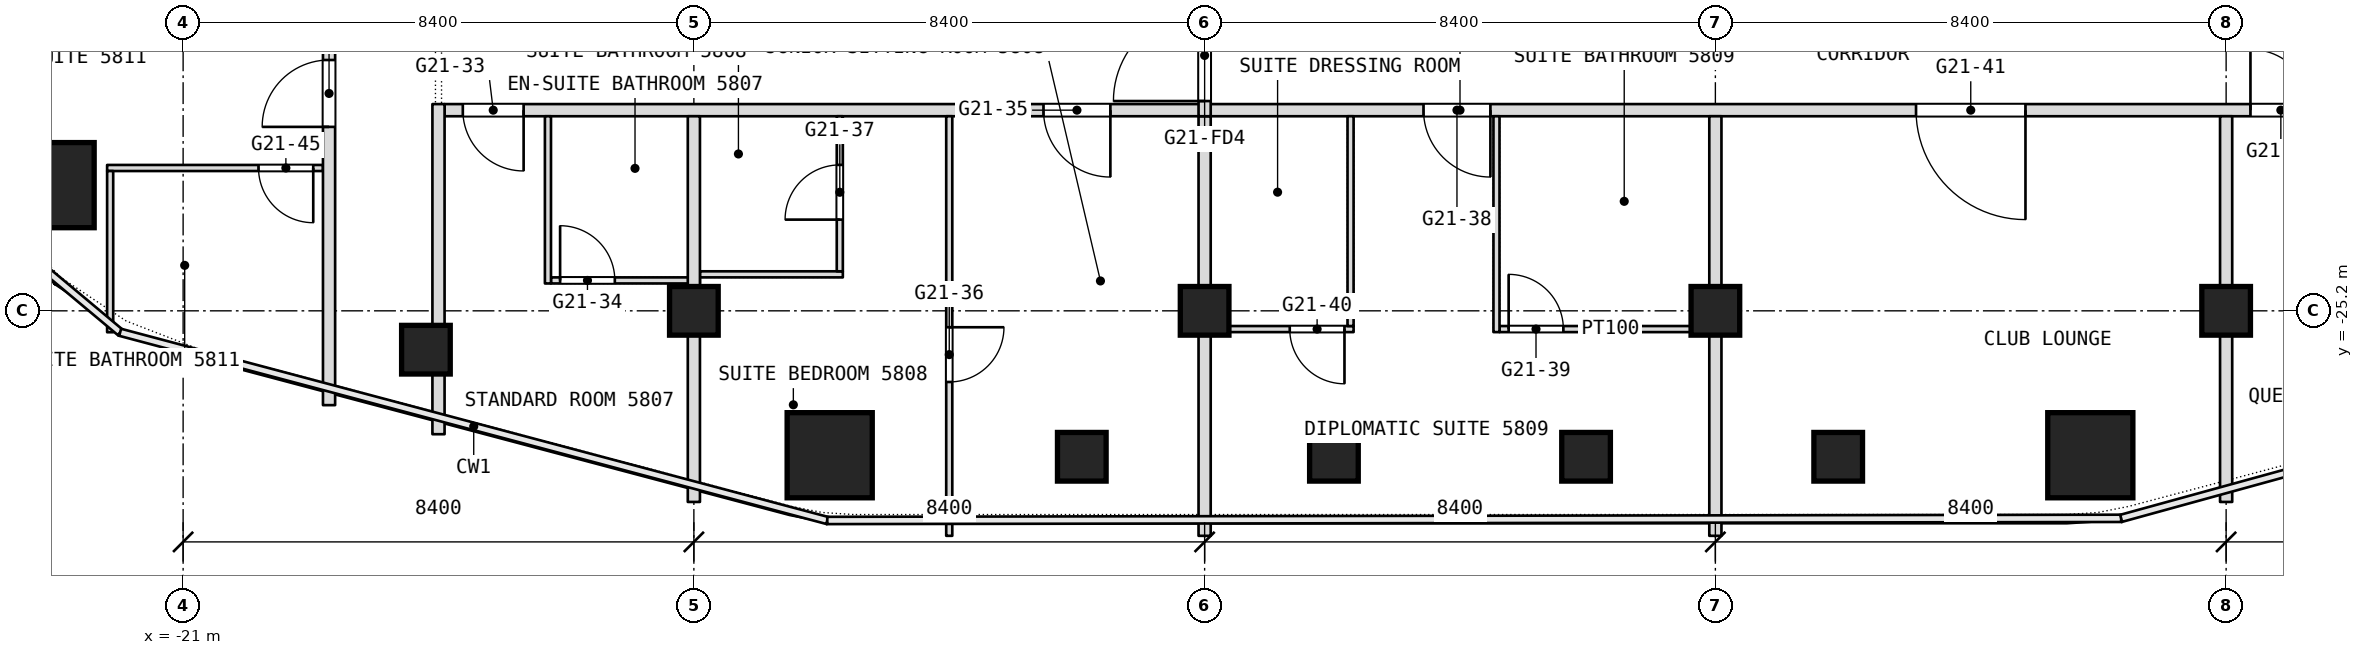
"""IFC4 building model, lengths in metres.
Left out: names, types, materials, properties, quantities, classifications, styles, units other than length and angle.
Written with IfcOpenShell. Run it as: python <this file> out.ifc"""

import sys

from ifc_helpers import new_model, si_unit, direction, frame, frame_2d, origin, origin_2d, place, context, subcontext, project, spatial, rectangle, extrude, element, fill, save


model = new_model("IFC4")
c1 = context("Model", 3, precision=1e-05, world=origin(), true_north=direction((0.0, 1.0)))
c2 = subcontext(c1, "Body", "Model", "MODEL_VIEW")
j1 = project(units=[si_unit("LENGTHUNIT", "METRE"), si_unit("PLANEANGLEUNIT", "RADIAN")], contexts=[c1])
p1 = place(None, origin())
s1 = spatial("IfcSite", under=j1, at=p1, CompositionType="ELEMENT")
p2 = place(p1, origin())
s2 = spatial("IfcBuilding", under=s1, at=p2, CompositionType="ELEMENT")
p3 = place(p2, frame((0.0, 0.0, 245.3)))
s3 = spatial("IfcBuildingStorey", under=s2, at=p3, CompositionType="ELEMENT", Elevation=245.3)
for number, where, z_axis, x_axis in (
    (1, (-23.163, -23.133, 0.0), (0.0, 0.0, 1.0), (1.0, 0.0, 0.0)),
    (2, (-10.366, -27.575, 0.0), (0.0, 0.0, 1.0), (1.0, 0.0, 0.0)),
    (3, (10.366, -27.575, 0.0), (0.0, 0.0, 1.0), (1.0, 0.0, 0.0)),
):
    element("IfcColumn", number, at=place(p3, frame(where, z_axis=z_axis, x_axis=x_axis)), inside=s3, PredefinedType="COLUMN", context=c2, shape_type="SweptSolid", body=[
        extrude(rectangle(XDim=1.4, YDim=1.4, at=origin_2d()), origin(), (0.0, 0.0, 1.0), 3.6),
    ])
for number, where, z_axis, x_axis in (
    (4, (-12.6, -25.2, 0.0), (0.0, 0.0, 1.0), (1.0, 0.0, 0.0)),
    (5, (-4.2, -25.2, 0.0), (0.0, 0.0, 1.0), (1.0, 0.0, 0.0)),
    (6, (4.2, -25.2, 0.0), (0.0, 0.0, 1.0), (1.0, 0.0, 0.0)),
    (7, (12.6, -25.2, 0.0), (0.0, 0.0, 1.0), (1.0, 0.0, 0.0)),
    (8, (6.22, -27.6, 0.0), (0.0, 0.0, 1.0), (1.0, 0.0, 0.0)),
    (9, (2.073, -27.6, 0.0), (0.0, 0.0, 1.0), (1.0, 0.0, 0.0)),
    (10, (-2.073, -27.6, 0.0), (0.0, 0.0, 1.0), (1.0, 0.0, 0.0)),
    (11, (-6.22, -27.6, 0.0), (0.0, 0.0, 1.0), (1.0, 0.0, 0.0)),
    (12, (-17.007, -25.839, 0.0), (0.0, 0.0, 1.0), (1.0, 0.0, 0.0)),
):
    element("IfcColumn", number, at=place(p3, frame(where, z_axis=z_axis, x_axis=x_axis)), inside=s3, PredefinedType="COLUMN", context=c2, shape_type="SweptSolid", body=[
        extrude(rectangle(XDim=0.8, YDim=0.8, at=origin_2d()), origin(), (0.0, 0.0, 1.0), 3.6),
    ])
p4 = place(p3, frame((-4.1, -25.5, 0.0), z_axis=(0.0, 0.0, 1.0), x_axis=(1.0, 0.0, 0.0)))
e13 = element("IfcWall", 13, at=p4, inside=s3, PredefinedType="PARTITIONING", context=c2, shape_type="SweptSolid", body=[
    extrude(rectangle(XDim=2.35, YDim=0.1, at=frame_2d((1.175, 0.0))), origin(), (0.0, 0.0, 1.0), 3.34),
])
p5 = place(p4, frame((1.3, 0.0, 0.0)))
e14 = element("IfcOpeningElement", 14, at=p5, cuts=e13, PredefinedType="OPENING", context=c2, shape_type="SweptSolid", body=[
    extrude(rectangle(XDim=0.9, YDim=2.1, at=frame_2d((0.45, 1.05))), frame((0.0, 0.05, 0.0), z_axis=(0.0, -1.0, 0.0), x_axis=(1.0, 0.0, 0.0)), (0.0, 0.0, 1.0), 0.1),
])
p6 = place(p3, frame((0.65, -25.5, 0.0), z_axis=(0.0, 0.0, 1.0), x_axis=(1.0, 0.0, 0.0)))
e15 = element("IfcWall", 15, at=p6, inside=s3, PredefinedType="PARTITIONING", context=c2, shape_type="SweptSolid", body=[
    extrude(rectangle(XDim=3.65, YDim=0.1, at=frame_2d((1.825, 0.0))), origin(), (0.0, 0.0, 1.0), 3.34),
])
p7 = place(p6, frame((0.15, 0.0, 0.0)))
e16 = element("IfcOpeningElement", 16, at=p7, cuts=e15, PredefinedType="OPENING", context=c2, shape_type="SweptSolid", body=[
    extrude(rectangle(XDim=0.9, YDim=2.1, at=frame_2d((0.45, 1.05))), frame((0.0, 0.05, 0.0), z_axis=(0.0, -1.0, 0.0), x_axis=(1.0, 0.0, 0.0)), (0.0, 0.0, 1.0), 0.1),
])
p8 = place(p3, frame((-14.95, -24.7, 0.0), z_axis=(0.0, 0.0, 1.0), x_axis=(1.0, 0.0, 0.0)))
e17 = element("IfcWall", 17, at=p8, inside=s3, PredefinedType="PARTITIONING", context=c2, shape_type="SweptSolid", body=[
    extrude(rectangle(XDim=2.45, YDim=0.1, at=frame_2d((1.225, 0.0))), origin(), (0.0, 0.0, 1.0), 3.34),
])
p9 = place(p8, frame((0.15, 0.0, 0.0)))
e18 = element("IfcOpeningElement", 18, at=p9, cuts=e17, PredefinedType="OPENING", context=c2, shape_type="SweptSolid", body=[
    extrude(rectangle(XDim=0.9, YDim=2.1, at=frame_2d((0.45, 1.05))), frame((0.0, 0.05, 0.0), z_axis=(0.0, -1.0, 0.0), x_axis=(1.0, 0.0, 0.0)), (0.0, 0.0, 1.0), 0.1),
])
p10 = place(p3, frame((-12.5, -24.6, 0.0), z_axis=(0.0, 0.0, 1.0), x_axis=(1.0, 0.0, 0.0)))
e19 = element("IfcWall", 19, at=p10, inside=s3, PredefinedType="PARTITIONING", context=c2, shape_type="SweptSolid", body=[
    extrude(rectangle(XDim=2.35, YDim=0.1, at=frame_2d((1.175, 0.0))), origin(), (0.0, 0.0, 1.0), 3.34),
])
p11 = place(p3, frame((-22.25, -22.851, 0.0), z_axis=(0.0, 0.0, 1.0), x_axis=(1.0, 0.0, 0.0)))
e20 = element("IfcWall", 20, at=p11, inside=s3, PredefinedType="PARTITIONING", context=c2, shape_type="SweptSolid", body=[
    extrude(rectangle(XDim=3.55, YDim=0.1, at=frame_2d((1.775, 0.0))), origin(), (0.0, 0.0, 1.0), 3.34),
])
p12 = place(p11, frame((2.49, 0.0, 0.0)))
e21 = element("IfcOpeningElement", 21, at=p12, cuts=e20, PredefinedType="OPENING", context=c2, shape_type="SweptSolid", body=[
    extrude(rectangle(XDim=0.9, YDim=2.1, at=frame_2d((0.45, 1.05))), frame((0.0, 0.05, 0.0), z_axis=(0.0, -1.0, 0.0), x_axis=(1.0, 0.0, 0.0)), (0.0, 0.0, 1.0), 0.1),
])
p13 = place(p3, frame((-16.7, -21.9, 0.0), z_axis=(0.0, 0.0, 1.0), x_axis=(1.0, 0.0, 0.0)))
e22 = element("IfcWall", 22, at=p13, inside=s3, PredefinedType="PARTITIONING", context=c2, shape_type="SweptSolid", body=[
    extrude(rectangle(XDim=33.4, YDim=0.2, at=frame_2d((16.7, 0.0))), origin(), (0.0, 0.0, 1.0), 3.34),
])
p14 = place(p13, frame((0.3, 0.0, 0.0)))
e23 = element("IfcOpeningElement", 23, at=p14, cuts=e22, PredefinedType="OPENING", context=c2, shape_type="SweptSolid", body=[
    extrude(rectangle(XDim=1.0, YDim=2.1, at=frame_2d((0.5, 1.05))), frame((0.0, 0.1, 0.0), z_axis=(0.0, -1.0, 0.0), x_axis=(1.0, 0.0, 0.0)), (0.0, 0.0, 1.0), 0.2),
])
p15 = place(p13, frame((9.85, 0.0, 0.0)))
e24 = element("IfcOpeningElement", 24, at=p15, cuts=e22, PredefinedType="OPENING", context=c2, shape_type="SweptSolid", body=[
    extrude(rectangle(XDim=1.1, YDim=2.1, at=frame_2d((0.55, 1.05))), frame((0.0, 0.1, 0.0), z_axis=(0.0, -1.0, 0.0), x_axis=(1.0, 0.0, 0.0)), (0.0, 0.0, 1.0), 0.2),
])
p16 = place(p13, frame((16.1, 0.0, 0.0)))
e25 = element("IfcOpeningElement", 25, at=p16, cuts=e22, PredefinedType="OPENING", context=c2, shape_type="SweptSolid", body=[
    extrude(rectangle(XDim=1.1, YDim=2.1, at=frame_2d((0.55, 1.05))), frame((0.0, 0.1, 0.0), z_axis=(0.0, -1.0, 0.0), x_axis=(1.0, 0.0, 0.0)), (0.0, 0.0, 1.0), 0.2),
])
p17 = place(p13, frame((24.2, 0.0, 0.0)))
e26 = element("IfcOpeningElement", 26, at=p17, cuts=e22, PredefinedType="OPENING", context=c2, shape_type="SweptSolid", body=[
    extrude(rectangle(XDim=1.8, YDim=2.1, at=frame_2d((0.9, 1.05))), frame((0.0, 0.1, 0.0), z_axis=(0.0, -1.0, 0.0), x_axis=(1.0, 0.0, 0.0)), (0.0, 0.0, 1.0), 0.2),
])
p18 = place(p13, frame((29.7, 0.0, 0.0)))
e27 = element("IfcOpeningElement", 27, at=p18, cuts=e22, PredefinedType="OPENING", context=c2, shape_type="SweptSolid", body=[
    extrude(rectangle(XDim=1.0, YDim=2.1, at=frame_2d((0.5, 1.05))), frame((0.0, 0.1, 0.0), z_axis=(0.0, -1.0, 0.0), x_axis=(1.0, 0.0, 0.0)), (0.0, 0.0, 1.0), 0.2),
])
p19 = place(p3, frame((12.6, -28.343, 0.0), z_axis=(0.0, 0.0, 1.0), x_axis=(0.0, 1.0, 0.0)))
e28 = element("IfcWall", 28, at=p19, inside=s3, PredefinedType="PARTITIONING", context=c2, shape_type="SweptSolid", body=[
    extrude(rectangle(XDim=6.343, YDim=0.2, at=frame_2d((3.171, 0.0))), origin(), (0.0, 0.0, 1.0), 3.34),
])
p20 = place(p3, frame((4.2, -28.9, 0.0), z_axis=(0.0, 0.0, 1.0), x_axis=(0.0, 1.0, 0.0)))
e29 = element("IfcWall", 29, at=p20, inside=s3, PredefinedType="PARTITIONING", context=c2, shape_type="SweptSolid", body=[
    extrude(rectangle(XDim=6.9, YDim=0.2, at=frame_2d((3.45, 0.0))), origin(), (0.0, 0.0, 1.0), 3.34),
])
p21 = place(p3, frame((0.6, -25.55, 0.0), z_axis=(0.0, 0.0, 1.0), x_axis=(0.0, 1.0, 0.0)))
e30 = element("IfcWall", 30, at=p21, inside=s3, PredefinedType="PARTITIONING", context=c2, shape_type="SweptSolid", body=[
    extrude(rectangle(XDim=3.55, YDim=0.1, at=frame_2d((1.775, 0.0))), origin(), (0.0, 0.0, 1.0), 3.34),
])
p22 = place(p3, frame((-1.8, -25.45, 0.0), z_axis=(0.0, 0.0, 1.0), x_axis=(0.0, 1.0, 0.0)))
e31 = element("IfcWall", 31, at=p22, inside=s3, PredefinedType="PARTITIONING", context=c2, shape_type="SweptSolid", body=[
    extrude(rectangle(XDim=3.45, YDim=0.1, at=frame_2d((1.725, 0.0))), origin(), (0.0, 0.0, 1.0), 3.34),
])
p23 = place(p3, frame((-4.2, -28.9, 0.0), z_axis=(0.0, 0.0, 1.0), x_axis=(0.0, 1.0, 0.0)))
e32 = element("IfcWall", 32, at=p23, inside=s3, PredefinedType="PARTITIONING", context=c2, shape_type="SweptSolid", body=[
    extrude(rectangle(XDim=6.9, YDim=0.2, at=frame_2d((3.45, 0.0))), origin(), (0.0, 0.0, 1.0), 3.34),
])
p24 = place(p3, frame((-4.2, -22.0, 0.0), z_axis=(0.0, 0.0, 1.0), x_axis=(0.0, 1.0, 0.0)))
e33 = element("IfcWall", 33, at=p24, inside=s3, PredefinedType="PARTITIONING", context=c2, shape_type="SweptSolid", body=[
    extrude(rectangle(XDim=8.4, YDim=0.2, at=frame_2d((4.2, 0.0))), origin(), (0.0, 0.0, 1.0), 3.34),
])
p25 = place(p24, frame((0.25, 0.0, 0.0)))
e34 = element("IfcOpeningElement", 34, at=p25, cuts=e33, PredefinedType="OPENING", context=c2, shape_type="SweptSolid", body=[
    extrude(rectangle(XDim=1.5, YDim=2.1, at=frame_2d((0.75, 1.05))), frame((0.0, 0.1, 0.0), z_axis=(0.0, -1.0, 0.0), x_axis=(1.0, 0.0, 0.0)), (0.0, 0.0, 1.0), 0.2),
])
p26 = place(p3, frame((-8.4, -28.9, 0.0), z_axis=(0.0, 0.0, 1.0), x_axis=(0.0, 1.0, 0.0)))
e35 = element("IfcWall", 35, at=p26, inside=s3, PredefinedType="PARTITIONING", context=c2, shape_type="SweptSolid", body=[
    extrude(rectangle(XDim=6.9, YDim=0.1, at=frame_2d((3.45, 0.0))), origin(), (0.0, 0.0, 1.0), 3.34),
])
p27 = place(p26, frame((2.53, 0.0, 0.0)))
e36 = element("IfcOpeningElement", 36, at=p27, cuts=e35, PredefinedType="OPENING", context=c2, shape_type="SweptSolid", body=[
    extrude(rectangle(XDim=0.9, YDim=2.1, at=frame_2d((0.45, 1.05))), frame((0.0, 0.05, 0.0), z_axis=(0.0, -1.0, 0.0), x_axis=(1.0, 0.0, 0.0)), (0.0, 0.0, 1.0), 0.1),
])
p28 = place(p3, frame((-10.2, -24.55, 0.0), z_axis=(0.0, 0.0, 1.0), x_axis=(0.0, 1.0, 0.0)))
e37 = element("IfcWall", 37, at=p28, inside=s3, PredefinedType="PARTITIONING", context=c2, shape_type="SweptSolid", body=[
    extrude(rectangle(XDim=2.55, YDim=0.1, at=frame_2d((1.275, 0.0))), origin(), (0.0, 0.0, 1.0), 3.34),
])
p29 = place(p28, frame((0.85, 0.0, 0.0)))
e38 = element("IfcOpeningElement", 38, at=p29, cuts=e37, PredefinedType="OPENING", context=c2, shape_type="SweptSolid", body=[
    extrude(rectangle(XDim=0.9, YDim=2.1, at=frame_2d((0.45, 1.05))), frame((0.0, 0.05, 0.0), z_axis=(0.0, -1.0, 0.0), x_axis=(1.0, 0.0, 0.0)), (0.0, 0.0, 1.0), 0.1),
])
p30 = place(p3, frame((-12.6, -28.343, 0.0), z_axis=(0.0, 0.0, 1.0), x_axis=(0.0, 1.0, 0.0)))
e39 = element("IfcWall", 39, at=p30, inside=s3, PredefinedType="PARTITIONING", context=c2, shape_type="SweptSolid", body=[
    extrude(rectangle(XDim=6.343, YDim=0.2, at=frame_2d((3.171, 0.0))), origin(), (0.0, 0.0, 1.0), 3.34),
])
p31 = place(p3, frame((-15.0, -24.75, 0.0), z_axis=(0.0, 0.0, 1.0), x_axis=(0.0, 1.0, 0.0)))
e40 = element("IfcWall", 40, at=p31, inside=s3, PredefinedType="PARTITIONING", context=c2, shape_type="SweptSolid", body=[
    extrude(rectangle(XDim=2.75, YDim=0.1, at=frame_2d((1.375, 0.0))), origin(), (0.0, 0.0, 1.0), 3.34),
])
p32 = place(p3, frame((-16.8, -27.229, 0.0), z_axis=(0.0, 0.0, 1.0), x_axis=(0.0, 1.0, 0.0)))
e41 = element("IfcWall", 41, at=p32, inside=s3, PredefinedType="PARTITIONING", context=c2, shape_type="SweptSolid", body=[
    extrude(rectangle(XDim=5.429, YDim=0.2, at=frame_2d((2.714, 0.0))), origin(), (0.0, 0.0, 1.0), 3.34),
])
p33 = place(p3, frame((-18.6, -26.751, 0.0), z_axis=(0.0, 0.0, 1.0), x_axis=(0.0, 1.0, 0.0)))
e42 = element("IfcWall", 42, at=p33, inside=s3, PredefinedType="PARTITIONING", context=c2, shape_type="SweptSolid", body=[
    extrude(rectangle(XDim=49.091, YDim=0.2, at=frame_2d((24.545, 0.0))), origin(), (0.0, 0.0, 1.0), 3.34),
])
p34 = place(p33, frame((4.576, 0.0, 0.0)))
e43 = element("IfcOpeningElement", 43, at=p34, cuts=e42, PredefinedType="OPENING", context=c2, shape_type="SweptSolid", body=[
    extrude(rectangle(XDim=1.1, YDim=2.1, at=frame_2d((0.55, 1.05))), frame((0.0, 0.1, 0.0), z_axis=(0.0, -1.0, 0.0), x_axis=(1.0, 0.0, 0.0)), (0.0, 0.0, 1.0), 0.2),
])
p35 = place(p33, frame((13.551, 0.0, 0.0)))
e44 = element("IfcOpeningElement", 44, at=p35, cuts=e42, PredefinedType="OPENING", context=c2, shape_type="SweptSolid", body=[
    extrude(rectangle(XDim=1.1, YDim=2.1, at=frame_2d((0.55, 1.05))), frame((0.0, 0.1, 0.0), z_axis=(0.0, -1.0, 0.0), x_axis=(1.0, 0.0, 0.0)), (0.0, 0.0, 1.0), 0.2),
])
p36 = place(p33, frame((22.051, 0.0, 0.0)))
e45 = element("IfcOpeningElement", 45, at=p36, cuts=e42, PredefinedType="OPENING", context=c2, shape_type="SweptSolid", body=[
    extrude(rectangle(XDim=1.1, YDim=2.1, at=frame_2d((0.55, 1.05))), frame((0.0, 0.1, 0.0), z_axis=(0.0, -1.0, 0.0), x_axis=(1.0, 0.0, 0.0)), (0.0, 0.0, 1.0), 0.2),
])
p37 = place(p33, frame((30.351, 0.0, 0.0)))
e46 = element("IfcOpeningElement", 46, at=p37, cuts=e42, PredefinedType="OPENING", context=c2, shape_type="SweptSolid", body=[
    extrude(rectangle(XDim=1.1, YDim=2.1, at=frame_2d((0.55, 1.05))), frame((0.0, 0.1, 0.0), z_axis=(0.0, -1.0, 0.0), x_axis=(1.0, 0.0, 0.0)), (0.0, 0.0, 1.0), 0.2),
])
p38 = place(p33, frame((38.851, 0.0, 0.0)))
e47 = element("IfcOpeningElement", 47, at=p38, cuts=e42, PredefinedType="OPENING", context=c2, shape_type="SweptSolid", body=[
    extrude(rectangle(XDim=1.1, YDim=2.1, at=frame_2d((0.55, 1.05))), frame((0.0, 0.1, 0.0), z_axis=(0.0, -1.0, 0.0), x_axis=(1.0, 0.0, 0.0)), (0.0, 0.0, 1.0), 0.2),
])
p39 = place(p33, frame((44.051, 0.0, 0.0)))
e48 = element("IfcOpeningElement", 48, at=p39, cuts=e42, PredefinedType="OPENING", context=c2, shape_type="SweptSolid", body=[
    extrude(rectangle(XDim=1.0, YDim=2.1, at=frame_2d((0.5, 1.05))), frame((0.0, 0.1, 0.0), z_axis=(0.0, -1.0, 0.0), x_axis=(1.0, 0.0, 0.0)), (0.0, 0.0, 1.0), 0.2),
])
p40 = place(p3, frame((-22.2, -25.552, 0.0), z_axis=(0.0, 0.0, 1.0), x_axis=(0.0, 1.0, 0.0)))
e49 = element("IfcWall", 49, at=p40, inside=s3, PredefinedType="PARTITIONING", context=c2, shape_type="SweptSolid", body=[
    extrude(rectangle(XDim=2.651, YDim=0.1, at=frame_2d((1.326, 0.0))), origin(), (0.0, 0.0, 1.0), 3.34),
])
p41 = place(p5, origin())
e50 = element("IfcDoor", 50, at=p41, inside=s3, OperationType="SINGLE_SWING_RIGHT", PredefinedType="DOOR", context=c2, shape_type="SweptSolid", body=[
    extrude(rectangle(XDim=0.9, YDim=2.1, at=frame_2d((0.45, 1.05))), frame((0.0, 0.025, 0.0), z_axis=(0.0, -1.0, 0.0), x_axis=(1.0, 0.0, 0.0)), (0.0, 0.0, 1.0), 0.05),
])
fill(e14, e50)
p42 = place(p7, origin())
e51 = element("IfcDoor", 51, at=p42, inside=s3, OperationType="SINGLE_SWING_LEFT", PredefinedType="DOOR", context=c2, shape_type="SweptSolid", body=[
    extrude(rectangle(XDim=0.9, YDim=2.1, at=frame_2d((0.45, 1.05))), frame((0.0, 0.025, 0.0), z_axis=(0.0, -1.0, 0.0), x_axis=(1.0, 0.0, 0.0)), (0.0, 0.0, 1.0), 0.05),
])
fill(e16, e51)
p43 = place(p9, origin())
e52 = element("IfcDoor", 52, at=p43, inside=s3, OperationType="SINGLE_SWING_LEFT", PredefinedType="DOOR", context=c2, shape_type="SweptSolid", body=[
    extrude(rectangle(XDim=0.9, YDim=2.1, at=frame_2d((0.45, 1.05))), frame((0.0, 0.025, 0.0), z_axis=(0.0, -1.0, 0.0), x_axis=(1.0, 0.0, 0.0)), (0.0, 0.0, 1.0), 0.05),
])
fill(e18, e52)
p44 = place(p12, origin())
e53 = element("IfcDoor", 53, at=p44, inside=s3, OperationType="SINGLE_SWING_LEFT", PredefinedType="DOOR", context=c2, shape_type="SweptSolid", body=[
    extrude(rectangle(XDim=0.9, YDim=2.1, at=frame_2d((0.45, 1.05))), frame((0.0, 0.025, 0.0), z_axis=(0.0, -1.0, 0.0), x_axis=(1.0, 0.0, 0.0)), (0.0, 0.0, 1.0), 0.05),
])
fill(e21, e53)
p45 = place(p14, origin())
e54 = element("IfcDoor", 54, at=p45, inside=s3, OperationType="SINGLE_SWING_RIGHT", PredefinedType="DOOR", context=c2, shape_type="SweptSolid", body=[
    extrude(rectangle(XDim=1.0, YDim=2.1, at=frame_2d((0.5, 1.05))), frame((0.0, 0.025, 0.0), z_axis=(0.0, -1.0, 0.0), x_axis=(1.0, 0.0, 0.0)), (0.0, 0.0, 1.0), 0.05),
])
fill(e23, e54)
p46 = place(p15, origin())
e55 = element("IfcDoor", 55, at=p46, inside=s3, OperationType="SINGLE_SWING_LEFT", PredefinedType="DOOR", context=c2, shape_type="SweptSolid", body=[
    extrude(rectangle(XDim=1.1, YDim=2.1, at=frame_2d((0.55, 1.05))), frame((0.0, 0.025, 0.0), z_axis=(0.0, -1.0, 0.0), x_axis=(1.0, 0.0, 0.0)), (0.0, 0.0, 1.0), 0.05),
])
fill(e24, e55)
p47 = place(p16, origin())
e56 = element("IfcDoor", 56, at=p47, inside=s3, OperationType="SINGLE_SWING_LEFT", PredefinedType="DOOR", context=c2, shape_type="SweptSolid", body=[
    extrude(rectangle(XDim=1.1, YDim=2.1, at=frame_2d((0.55, 1.05))), frame((0.0, 0.025, 0.0), z_axis=(0.0, -1.0, 0.0), x_axis=(1.0, 0.0, 0.0)), (0.0, 0.0, 1.0), 0.05),
])
fill(e25, e56)
p48 = place(p17, origin())
e57 = element("IfcDoor", 57, at=p48, inside=s3, OperationType="DOUBLE_DOOR_SINGLE_SWING", PredefinedType="DOOR", context=c2, shape_type="SweptSolid", body=[
    extrude(rectangle(XDim=1.8, YDim=2.1, at=frame_2d((0.9, 1.05))), frame((0.0, 0.025, 0.0), z_axis=(0.0, -1.0, 0.0), x_axis=(1.0, 0.0, 0.0)), (0.0, 0.0, 1.0), 0.05),
])
fill(e26, e57)
p49 = place(p18, origin())
e58 = element("IfcDoor", 58, at=p49, inside=s3, OperationType="SINGLE_SWING_RIGHT", PredefinedType="DOOR", context=c2, shape_type="SweptSolid", body=[
    extrude(rectangle(XDim=1.0, YDim=2.1, at=frame_2d((0.5, 1.05))), frame((0.0, 0.025, 0.0), z_axis=(0.0, -1.0, 0.0), x_axis=(1.0, 0.0, 0.0)), (0.0, 0.0, 1.0), 0.05),
])
fill(e27, e58)
p50 = place(p27, origin())
e59 = element("IfcDoor", 59, at=p50, inside=s3, OperationType="SINGLE_SWING_LEFT", PredefinedType="DOOR", context=c2, shape_type="SweptSolid", body=[
    extrude(rectangle(XDim=0.9, YDim=2.1, at=frame_2d((0.45, 1.05))), frame((0.0, 0.025, 0.0), z_axis=(0.0, -1.0, 0.0), x_axis=(1.0, 0.0, 0.0)), (0.0, 0.0, 1.0), 0.05),
])
fill(e36, e59)
p51 = place(p29, origin())
e60 = element("IfcDoor", 60, at=p51, inside=s3, OperationType="SINGLE_SWING_RIGHT", PredefinedType="DOOR", context=c2, shape_type="SweptSolid", body=[
    extrude(rectangle(XDim=0.9, YDim=2.1, at=frame_2d((0.45, 1.05))), frame((0.0, 0.025, 0.0), z_axis=(0.0, -1.0, 0.0), x_axis=(1.0, 0.0, 0.0)), (0.0, 0.0, 1.0), 0.05),
])
fill(e38, e60)
p52 = place(p34, origin())
e61 = element("IfcDoor", 61, at=p52, inside=s3, OperationType="SINGLE_SWING_LEFT", PredefinedType="DOOR", context=c2, shape_type="SweptSolid", body=[
    extrude(rectangle(XDim=1.1, YDim=2.1, at=frame_2d((0.55, 1.05))), frame((0.0, 0.025, 0.0), z_axis=(0.0, -1.0, 0.0), x_axis=(1.0, 0.0, 0.0)), (0.0, 0.0, 1.0), 0.05),
])
fill(e43, e61)
p53 = place(p25, origin())
e62 = element("IfcDoor", 62, at=p53, inside=s3, OperationType="DOUBLE_DOOR_DOUBLE_SWING", PredefinedType="DOOR", context=c2, shape_type="SweptSolid", body=[
    extrude(rectangle(XDim=1.5, YDim=2.1, at=frame_2d((0.75, 1.05))), frame((0.0, 0.025, 0.0), z_axis=(0.0, -1.0, 0.0), x_axis=(1.0, 0.0, 0.0)), (0.0, 0.0, 1.0), 0.05),
])
fill(e34, e62)
save(model, sys.argv[1])
